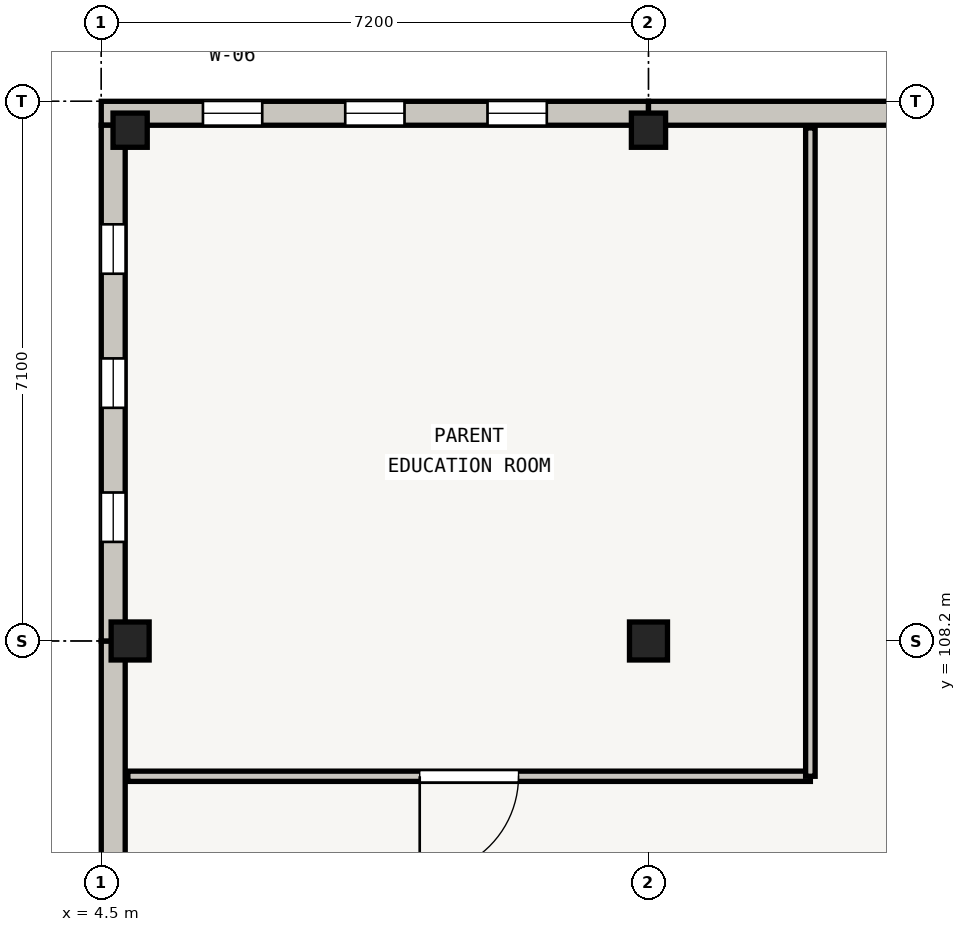
"""IFC4 building model, lengths in metres.
Left out: names, types, materials, properties, quantities, classifications, styles, units other than length and angle.
Written with IfcOpenShell. Run it as: python <this file> out.ifc"""

import sys

from ifc_helpers import new_model, si_unit, direction, frame, frame_2d, origin, origin_2d, place, context, subcontext, project, spatial, rectangle, extrude, element, fill, save


model = new_model("IFC4")
c1 = context("Model", 3, precision=1e-05, world=origin(), true_north=direction((0.0, 1.0)))
c2 = subcontext(c1, "Body", "Model", "MODEL_VIEW")
j1 = project(units=[si_unit("LENGTHUNIT", "METRE"), si_unit("PLANEANGLEUNIT", "RADIAN")], contexts=[c1])
p1 = place(None, origin())
s1 = spatial("IfcSite", under=j1, at=p1, CompositionType="ELEMENT")
p2 = place(p1, origin())
s2 = spatial("IfcBuilding", under=s1, at=p2, CompositionType="ELEMENT")
p3 = place(p2, frame((0.0, 0.0, 12.9)))
s3 = spatial("IfcBuildingStorey", under=s2, at=p3, CompositionType="ELEMENT", Elevation=12.9)
p4 = place(p3, frame((4.88, 108.2, 0.0), z_axis=(0.0, 0.0, 1.0), x_axis=(1.0, 0.0, 0.0)))
e1 = element("IfcColumn", 1, at=p4, inside=s3, PredefinedType="COLUMN", context=c2, shape_type="SweptSolid", body=[
    extrude(rectangle(XDim=0.5, YDim=0.5, at=origin_2d()), origin(), (0.0, 0.0, 1.0), 4.025),
])
p5 = place(p3, frame((4.88, 114.92, 0.0), z_axis=(0.0, 0.0, 1.0), x_axis=(1.0, 0.0, 0.0)))
e2 = element("IfcColumn", 2, at=p5, inside=s3, PredefinedType="COLUMN", context=c2, shape_type="SweptSolid", body=[
    extrude(rectangle(XDim=0.45, YDim=0.45, at=origin_2d()), origin(), (0.0, 0.0, 1.0), 4.025),
])
p6 = place(p3, frame((11.7, 108.2, 0.0), z_axis=(0.0, 0.0, 1.0), x_axis=(1.0, 0.0, 0.0)))
e3 = element("IfcColumn", 3, at=p6, inside=s3, PredefinedType="COLUMN", context=c2, shape_type="SweptSolid", body=[
    extrude(rectangle(XDim=0.5, YDim=0.5, at=origin_2d()), origin(), (0.0, 0.0, 1.0), 4.025),
])
p7 = place(p3, frame((11.7, 114.92, 0.0), z_axis=(0.0, 0.0, 1.0), x_axis=(1.0, 0.0, 0.0)))
e4 = element("IfcColumn", 4, at=p7, inside=s3, PredefinedType="COLUMN", context=c2, shape_type="SweptSolid", body=[
    extrude(rectangle(XDim=0.45, YDim=0.45, at=origin_2d()), origin(), (0.0, 0.0, 1.0), 4.025),
])
p8 = place(p3, frame((4.5, 115.143, 0.0), z_axis=(0.0, 0.0, 1.0), x_axis=(1.0, 0.0, 0.0)))
e5 = element("IfcWall", 5, at=p8, inside=s3, PredefinedType="SOLIDWALL", context=c2, shape_type="SweptSolid", body=[
    extrude(rectangle(XDim=7.2, YDim=0.315, at=frame_2d((3.6, 0.0))), origin(), (0.0, 0.0, 1.0), 4.015),
])
p9 = place(p8, frame((1.338, 0.0, 0.55)))
e6 = element("IfcOpeningElement", 6, at=p9, cuts=e5, PredefinedType="OPENING", context=c2, shape_type="SweptSolid", body=[
    extrude(rectangle(XDim=0.78, YDim=2.25, at=frame_2d((0.39, 1.125))), frame((0.0, 0.157, 0.0), z_axis=(0.0, -1.0, 0.0), x_axis=(1.0, 0.0, 0.0)), (0.0, 0.0, 1.0), 0.315),
])
p10 = place(p8, frame((3.21, 0.0, 0.55)))
e7 = element("IfcOpeningElement", 7, at=p10, cuts=e5, PredefinedType="OPENING", context=c2, shape_type="SweptSolid", body=[
    extrude(rectangle(XDim=0.78, YDim=2.25, at=frame_2d((0.39, 1.125))), frame((0.0, 0.157, 0.0), z_axis=(0.0, -1.0, 0.0), x_axis=(1.0, 0.0, 0.0)), (0.0, 0.0, 1.0), 0.315),
])
p11 = place(p8, frame((5.082, 0.0, 0.55)))
e8 = element("IfcOpeningElement", 8, at=p11, cuts=e5, PredefinedType="OPENING", context=c2, shape_type="SweptSolid", body=[
    extrude(rectangle(XDim=0.78, YDim=2.25, at=frame_2d((0.39, 1.125))), frame((0.0, 0.157, 0.0), z_axis=(0.0, -1.0, 0.0), x_axis=(1.0, 0.0, 0.0)), (0.0, 0.0, 1.0), 0.315),
])
p12 = place(p3, frame((11.7, 115.143, 0.0), z_axis=(0.0, 0.0, 1.0), x_axis=(1.0, 0.0, 0.0)))
e9 = element("IfcWall", 9, at=p12, inside=s3, PredefinedType="SOLIDWALL", context=c2, shape_type="SweptSolid", body=[
    extrude(rectangle(XDim=7.2, YDim=0.315, at=frame_2d((3.6, 0.0))), origin(), (0.0, 0.0, 1.0), 4.015),
])
p13 = place(p12, frame((3.19, 0.0, 0.55)))
e10 = element("IfcOpeningElement", 10, at=p13, cuts=e9, PredefinedType="OPENING", context=c2, shape_type="SweptSolid", body=[
    extrude(rectangle(XDim=0.82, YDim=2.2, at=frame_2d((0.41, 1.1))), frame((0.0, 0.157, 0.0), z_axis=(0.0, -1.0, 0.0), x_axis=(1.0, 0.0, 0.0)), (0.0, 0.0, 1.0), 0.315),
])
p14 = place(p3, frame((4.657, 101.48, 0.0), z_axis=(0.0, 0.0, 1.0), x_axis=(0.0, 1.0, 0.0)))
e11 = element("IfcWall", 11, at=p14, inside=s3, PredefinedType="SOLIDWALL", context=c2, shape_type="SweptSolid", body=[
    extrude(rectangle(XDim=6.72, YDim=0.315, at=frame_2d((3.36, 0.0))), origin(), (0.0, 0.0, 1.0), 3.687),
])
p15 = place(p14, frame((2.96, 0.0, 0.55)))
e12 = element("IfcOpeningElement", 12, at=p15, cuts=e11, PredefinedType="OPENING", context=c2, shape_type="SweptSolid", body=[
    extrude(rectangle(XDim=0.8, YDim=2.04, at=frame_2d((0.4, 1.02))), frame((0.0, 0.157, 0.0), z_axis=(0.0, -1.0, 0.0), x_axis=(1.0, 0.0, 0.0)), (0.0, 0.0, 1.0), 0.315),
])
p16 = place(p3, frame((4.657, 108.2, 0.0), z_axis=(0.0, 0.0, 1.0), x_axis=(0.0, 1.0, 0.0)))
e13 = element("IfcWall", 13, at=p16, inside=s3, PredefinedType="SOLIDWALL", context=c2, shape_type="SweptSolid", body=[
    extrude(rectangle(XDim=6.785, YDim=0.315, at=frame_2d((3.393, 0.0))), origin(), (0.0, 0.0, 1.0), 4.015),
])
p17 = place(p16, frame((1.303, 0.0, 0.55)))
e14 = element("IfcOpeningElement", 14, at=p17, cuts=e13, PredefinedType="OPENING", context=c2, shape_type="SweptSolid", body=[
    extrude(rectangle(XDim=0.65, YDim=2.14, at=frame_2d((0.325, 1.07))), frame((0.0, 0.157, 0.0), z_axis=(0.0, -1.0, 0.0), x_axis=(1.0, 0.0, 0.0)), (0.0, 0.0, 1.0), 0.315),
])
p18 = place(p16, frame((3.067, 0.0, 0.55)))
e15 = element("IfcOpeningElement", 15, at=p18, cuts=e13, PredefinedType="OPENING", context=c2, shape_type="SweptSolid", body=[
    extrude(rectangle(XDim=0.65, YDim=2.14, at=frame_2d((0.325, 1.07))), frame((0.0, 0.157, 0.0), z_axis=(0.0, -1.0, 0.0), x_axis=(1.0, 0.0, 0.0)), (0.0, 0.0, 1.0), 0.315),
])
p19 = place(p16, frame((4.832, 0.0, 0.55)))
e16 = element("IfcOpeningElement", 16, at=p19, cuts=e13, PredefinedType="OPENING", context=c2, shape_type="SweptSolid", body=[
    extrude(rectangle(XDim=0.65, YDim=2.14, at=frame_2d((0.325, 1.07))), frame((0.0, 0.157, 0.0), z_axis=(0.0, -1.0, 0.0), x_axis=(1.0, 0.0, 0.0)), (0.0, 0.0, 1.0), 0.315),
])
p20 = place(p3, frame((13.83, 106.42, 0.0), z_axis=(0.0, 0.0, 1.0), x_axis=(-1.0, 0.0, 0.0)))
e17 = element("IfcWall", 17, at=p20, inside=s3, PredefinedType="MOVABLE", context=c2, shape_type="SweptSolid", body=[
    extrude(rectangle(XDim=8.98, YDim=0.135, at=frame_2d((4.49, 0.0))), origin(), (0.0, 0.0, 1.0), 2.955),
])
p21 = place(p20, frame((3.84, 0.0, 0.0)))
e18 = element("IfcOpeningElement", 18, at=p21, cuts=e17, PredefinedType="OPENING", context=c2, shape_type="SweptSolid", body=[
    extrude(rectangle(XDim=1.3, YDim=2.1, at=frame_2d((0.65, 1.05))), frame((0.0, 0.067, 0.0), z_axis=(0.0, -1.0, 0.0), x_axis=(1.0, 0.0, 0.0)), (0.0, 0.0, 1.0), 0.135),
])
p22 = place(p3, frame((13.83, 114.95, 0.0), z_axis=(0.0, 0.0, 1.0), x_axis=(0.0, -1.0, 0.0)))
e19 = element("IfcWall", 19, at=p22, inside=s3, PredefinedType="PARTITIONING", context=c2, shape_type="SweptSolid", body=[
    extrude(rectangle(XDim=8.53, YDim=0.125, at=frame_2d((4.265, 0.0))), origin(), (0.0, 0.0, 1.0), 2.955),
])
p23 = place(p9, origin())
e20 = element("IfcWindow", 20, at=p23, inside=s3, PartitioningType="SINGLE_PANEL", PredefinedType="WINDOW", context=c2, shape_type="SweptSolid", body=[
    extrude(rectangle(XDim=0.78, YDim=2.25, at=frame_2d((0.39, 1.125))), frame((0.0, 0.03, 0.0), z_axis=(0.0, -1.0, 0.0), x_axis=(1.0, 0.0, 0.0)), (0.0, 0.0, 1.0), 0.06),
])
fill(e6, e20)
p24 = place(p10, origin())
e21 = element("IfcWindow", 21, at=p24, inside=s3, PartitioningType="SINGLE_PANEL", PredefinedType="WINDOW", context=c2, shape_type="SweptSolid", body=[
    extrude(rectangle(XDim=0.78, YDim=2.25, at=frame_2d((0.39, 1.125))), frame((0.0, 0.03, 0.0), z_axis=(0.0, -1.0, 0.0), x_axis=(1.0, 0.0, 0.0)), (0.0, 0.0, 1.0), 0.06),
])
fill(e7, e21)
p25 = place(p11, origin())
e22 = element("IfcWindow", 22, at=p25, inside=s3, PartitioningType="SINGLE_PANEL", PredefinedType="WINDOW", context=c2, shape_type="SweptSolid", body=[
    extrude(rectangle(XDim=0.78, YDim=2.25, at=frame_2d((0.39, 1.125))), frame((0.0, 0.03, 0.0), z_axis=(0.0, -1.0, 0.0), x_axis=(1.0, 0.0, 0.0)), (0.0, 0.0, 1.0), 0.06),
])
fill(e8, e22)
p26 = place(p17, origin())
e23 = element("IfcWindow", 23, at=p26, inside=s3, PartitioningType="SINGLE_PANEL", PredefinedType="WINDOW", context=c2, shape_type="SweptSolid", body=[
    extrude(rectangle(XDim=0.65, YDim=2.14, at=frame_2d((0.325, 1.07))), frame((0.0, 0.03, 0.0), z_axis=(0.0, -1.0, 0.0), x_axis=(1.0, 0.0, 0.0)), (0.0, 0.0, 1.0), 0.06),
])
fill(e14, e23)
p27 = place(p18, origin())
e24 = element("IfcWindow", 24, at=p27, inside=s3, PartitioningType="SINGLE_PANEL", PredefinedType="WINDOW", context=c2, shape_type="SweptSolid", body=[
    extrude(rectangle(XDim=0.65, YDim=2.14, at=frame_2d((0.325, 1.07))), frame((0.0, 0.03, 0.0), z_axis=(0.0, -1.0, 0.0), x_axis=(1.0, 0.0, 0.0)), (0.0, 0.0, 1.0), 0.06),
])
fill(e15, e24)
p28 = place(p19, origin())
e25 = element("IfcWindow", 25, at=p28, inside=s3, PartitioningType="SINGLE_PANEL", PredefinedType="WINDOW", context=c2, shape_type="SweptSolid", body=[
    extrude(rectangle(XDim=0.65, YDim=2.14, at=frame_2d((0.325, 1.07))), frame((0.0, 0.03, 0.0), z_axis=(0.0, -1.0, 0.0), x_axis=(1.0, 0.0, 0.0)), (0.0, 0.0, 1.0), 0.06),
])
fill(e16, e25)
p29 = place(p21, origin())
e26 = element("IfcDoor", 26, at=p29, inside=s3, OperationType="SINGLE_SWING_RIGHT", PredefinedType="DOOR", context=c2, shape_type="SweptSolid", body=[
    extrude(rectangle(XDim=1.3, YDim=2.1, at=frame_2d((0.65, 1.05))), frame((0.0, 0.025, 0.0), z_axis=(0.0, -1.0, 0.0), x_axis=(1.0, 0.0, 0.0)), (0.0, 0.0, 1.0), 0.05),
])
fill(e18, e26)
save(model, sys.argv[1])
